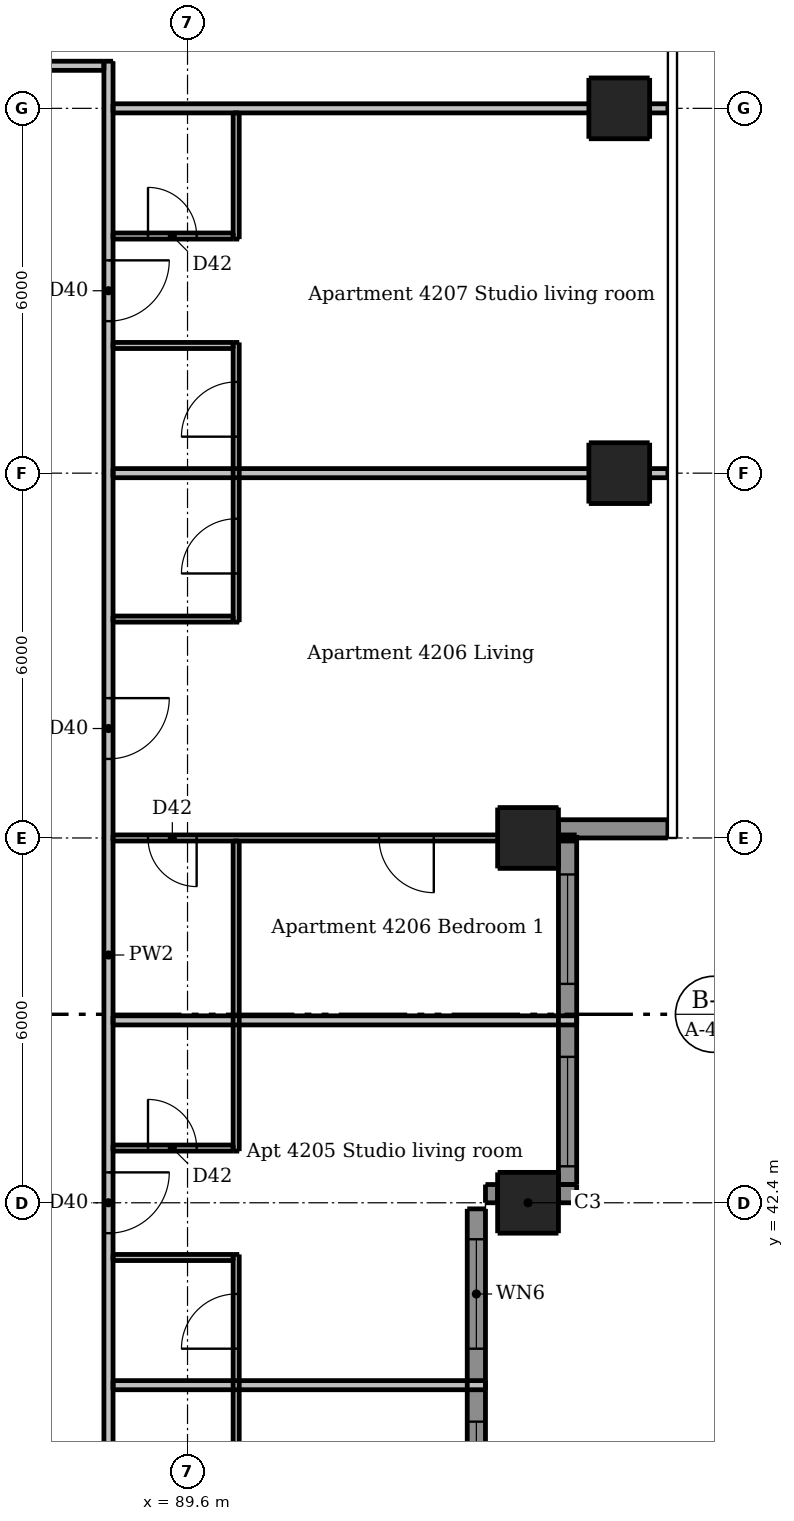
"""IFC4 building model, lengths in metres.
Left out: names, types, materials, properties, quantities, classifications, styles, units other than length and angle.
Written with IfcOpenShell. Run it as: python <this file> out.ifc"""

import sys

from ifc_helpers import new_model, si_unit, direction, frame, frame_2d, origin, origin_2d, place, context, subcontext, project, spatial, rectangle, extrude, element, fill, save


model = new_model("IFC4")
c1 = context("Model", 3, precision=1e-05, world=origin(), true_north=direction((0.0, 1.0)))
c2 = subcontext(c1, "Body", "Model", "MODEL_VIEW")
j1 = project(units=[si_unit("LENGTHUNIT", "METRE"), si_unit("PLANEANGLEUNIT", "RADIAN")], contexts=[c1])
p1 = place(None, origin())
s1 = spatial("IfcSite", under=j1, at=p1, CompositionType="ELEMENT")
p2 = place(p1, origin())
s2 = spatial("IfcBuilding", under=s1, at=p2, CompositionType="ELEMENT")
p3 = place(p2, frame((0.0, 0.0, 158.2)))
s3 = spatial("IfcBuildingStorey", under=s2, at=p3, CompositionType="ELEMENT", Elevation=158.2)
for number, where, z_axis, x_axis in (
    (1, (95.2, 42.4, 0.0), (0.0, 0.0, 1.0), (1.0, 0.0, 0.0)),
    (2, (95.2, 48.4, 0.0), (0.0, 0.0, 1.0), (1.0, 0.0, 0.0)),
    (3, (96.7, 54.4, 0.0), (0.0, 0.0, 1.0), (1.0, 0.0, 0.0)),
    (4, (96.7, 60.4, 0.0), (0.0, 0.0, 1.0), (1.0, 0.0, 0.0)),
):
    element("IfcColumn", number, at=place(p3, frame(where, z_axis=z_axis, x_axis=x_axis)), inside=s3, PredefinedType="COLUMN", context=c2, shape_type="SweptSolid", body=[
        extrude(rectangle(XDim=1.0, YDim=1.0, at=origin_2d()), origin(), (0.0, 0.0, 1.0), 3.05),
    ])
p4 = place(p3, frame((94.5, 42.55, 0.0), z_axis=(0.0, 0.0, 1.0), x_axis=(1.0, 0.0, 0.0)))
e5 = element("IfcWall", 5, at=p4, inside=s3, PredefinedType="SOLIDWALL", context=c2, shape_type="SweptSolid", body=[
    extrude(rectangle(XDim=0.2, YDim=0.3, at=frame_2d((0.1, 0.0))), origin(), (0.0, 0.0, 1.0), 3.05),
])
p5 = place(p3, frame((95.7, 42.55, 0.0), z_axis=(0.0, 0.0, 1.0), x_axis=(1.0, 0.0, 0.0)))
e6 = element("IfcWall", 6, at=p5, inside=s3, PredefinedType="SOLIDWALL", context=c2, shape_type="SweptSolid", body=[
    extrude(rectangle(XDim=0.3, YDim=0.3, at=frame_2d((0.15, 0.0))), origin(), (0.0, 0.0, 1.0), 3.05),
])
p6 = place(p3, frame((95.7, 48.55, 0.0), z_axis=(0.0, 0.0, 1.0), x_axis=(1.0, 0.0, 0.0)))
e7 = element("IfcWall", 7, at=p6, inside=s3, PredefinedType="SOLIDWALL", context=c2, shape_type="SweptSolid", body=[
    extrude(rectangle(XDim=1.8, YDim=0.3, at=frame_2d((0.9, 0.0))), origin(), (0.0, 0.0, 1.0), 3.05),
])
p7 = place(p3, frame((94.35, 36.7, 0.0), z_axis=(0.0, 0.0, 1.0), x_axis=(0.0, 1.0, 0.0)))
e8 = element("IfcWall", 8, at=p7, inside=s3, PredefinedType="SOLIDWALL", context=c2, shape_type="SweptSolid", body=[
    extrude(rectangle(XDim=5.6, YDim=0.3, at=frame_2d((2.8, 0.0))), origin(), (0.0, 0.0, 1.0), 3.05),
])
p8 = place(p7, frame((0.3, 0.0, 0.15)))
e9 = element("IfcOpeningElement", 9, at=p8, cuts=e8, PredefinedType="OPENING", context=c2, shape_type="SweptSolid", body=[
    extrude(rectangle(XDim=1.8, YDim=2.1, at=frame_2d((0.9, 1.05))), frame((0.0, 0.16, 0.0), z_axis=(0.0, -1.0, 0.0), x_axis=(1.0, 0.0, 0.0)), (0.0, 0.0, 1.0), 0.32),
])
p9 = place(p7, frame((3.3, 0.0, 0.15)))
e10 = element("IfcOpeningElement", 10, at=p9, cuts=e8, PredefinedType="OPENING", context=c2, shape_type="SweptSolid", body=[
    extrude(rectangle(XDim=1.8, YDim=2.1, at=frame_2d((0.9, 1.05))), frame((0.0, 0.16, 0.0), z_axis=(0.0, -1.0, 0.0), x_axis=(1.0, 0.0, 0.0)), (0.0, 0.0, 1.0), 0.32),
])
p10 = place(p3, frame((95.85, 42.7, 0.0), z_axis=(0.0, 0.0, 1.0), x_axis=(0.0, 1.0, 0.0)))
e11 = element("IfcWall", 11, at=p10, inside=s3, PredefinedType="SOLIDWALL", context=c2, shape_type="SweptSolid", body=[
    extrude(rectangle(XDim=5.7, YDim=0.3, at=frame_2d((2.85, 0.0))), origin(), (0.0, 0.0, 1.0), 3.05),
])
p11 = place(p10, frame((0.3, 0.0, 0.15)))
e12 = element("IfcOpeningElement", 12, at=p11, cuts=e11, PredefinedType="OPENING", context=c2, shape_type="SweptSolid", body=[
    extrude(rectangle(XDim=1.8, YDim=2.1, at=frame_2d((0.9, 1.05))), frame((0.0, 0.16, 0.0), z_axis=(0.0, -1.0, 0.0), x_axis=(1.0, 0.0, 0.0)), (0.0, 0.0, 1.0), 0.32),
])
p12 = place(p10, frame((3.3, 0.0, 0.15)))
e13 = element("IfcOpeningElement", 13, at=p12, cuts=e11, PredefinedType="OPENING", context=c2, shape_type="SweptSolid", body=[
    extrude(rectangle(XDim=1.8, YDim=2.1, at=frame_2d((0.9, 1.05))), frame((0.0, 0.16, 0.0), z_axis=(0.0, -1.0, 0.0), x_axis=(1.0, 0.0, 0.0)), (0.0, 0.0, 1.0), 0.32),
])
p13 = place(p3, frame((90.4, 33.45, 0.0), z_axis=(0.0, 0.0, 1.0), x_axis=(0.0, 1.0, 0.0)))
e14 = element("IfcWall", 14, at=p13, inside=s3, PredefinedType="PARTITIONING", context=c2, shape_type="SweptSolid", body=[
    extrude(rectangle(XDim=8.1, YDim=0.1, at=frame_2d((4.05, 0.0))), origin(), (0.0, 0.0, 1.0), 3.05),
])
p14 = place(p13, frame((3.75, 0.0, 0.0)))
e15 = element("IfcOpeningElement", 15, at=p14, cuts=e14, PredefinedType="OPENING", context=c2, shape_type="SweptSolid", body=[
    extrude(rectangle(XDim=0.8, YDim=2.1, at=frame_2d((0.4, 1.05))), frame((0.0, 0.06, 0.0), z_axis=(0.0, -1.0, 0.0), x_axis=(1.0, 0.0, 0.0)), (0.0, 0.0, 1.0), 0.12),
])
p15 = place(p13, frame((6.55, 0.0, 0.0)))
e16 = element("IfcOpeningElement", 16, at=p15, cuts=e14, PredefinedType="OPENING", context=c2, shape_type="SweptSolid", body=[
    extrude(rectangle(XDim=0.9, YDim=2.1, at=frame_2d((0.45, 1.05))), frame((0.0, 0.06, 0.0), z_axis=(0.0, -1.0, 0.0), x_axis=(1.0, 0.0, 0.0)), (0.0, 0.0, 1.0), 0.12),
])
p16 = place(p3, frame((90.4, 43.25, 0.0), z_axis=(0.0, 0.0, 1.0), x_axis=(0.0, 1.0, 0.0)))
e17 = element("IfcWall", 17, at=p16, inside=s3, PredefinedType="PARTITIONING", context=c2, shape_type="SweptSolid", body=[
    extrude(rectangle(XDim=5.1, YDim=0.1, at=frame_2d((2.55, 0.0))), origin(), (0.0, 0.0, 1.0), 3.05),
])
p17 = place(p3, frame((90.4, 51.95, 0.0), z_axis=(0.0, 0.0, 1.0), x_axis=(0.0, 1.0, 0.0)))
e18 = element("IfcWall", 18, at=p17, inside=s3, PredefinedType="PARTITIONING", context=c2, shape_type="SweptSolid", body=[
    extrude(rectangle(XDim=4.6, YDim=0.1, at=frame_2d((2.3, 0.0))), origin(), (0.0, 0.0, 1.0), 3.05),
])
p18 = place(p17, frame((0.8, 0.0, 0.0)))
e19 = element("IfcOpeningElement", 19, at=p18, cuts=e18, PredefinedType="OPENING", context=c2, shape_type="SweptSolid", body=[
    extrude(rectangle(XDim=0.9, YDim=2.1, at=frame_2d((0.45, 1.05))), frame((0.0, 0.06, 0.0), z_axis=(0.0, -1.0, 0.0), x_axis=(1.0, 0.0, 0.0)), (0.0, 0.0, 1.0), 0.12),
])
p19 = place(p17, frame((3.05, 0.0, 0.0)))
e20 = element("IfcOpeningElement", 20, at=p19, cuts=e18, PredefinedType="OPENING", context=c2, shape_type="SweptSolid", body=[
    extrude(rectangle(XDim=0.9, YDim=2.1, at=frame_2d((0.45, 1.05))), frame((0.0, 0.06, 0.0), z_axis=(0.0, -1.0, 0.0), x_axis=(1.0, 0.0, 0.0)), (0.0, 0.0, 1.0), 0.12),
])
p20 = place(p3, frame((90.4, 58.25, 0.0), z_axis=(0.0, 0.0, 1.0), x_axis=(0.0, 1.0, 0.0)))
e21 = element("IfcWall", 21, at=p20, inside=s3, PredefinedType="PARTITIONING", context=c2, shape_type="SweptSolid", body=[
    extrude(rectangle(XDim=2.075, YDim=0.1, at=frame_2d((1.038, 0.0))), origin(), (0.0, 0.0, 1.0), 3.05),
])
p21 = place(p3, frame((88.375, 58.3, 0.0), z_axis=(0.0, 0.0, 1.0), x_axis=(1.0, 0.0, 0.0)))
e22 = element("IfcWall", 22, at=p21, inside=s3, PredefinedType="PARTITIONING", context=c2, shape_type="SweptSolid", body=[
    extrude(rectangle(XDim=1.975, YDim=0.1, at=frame_2d((0.988, 0.0))), origin(), (0.0, 0.0, 1.0), 3.05),
])
p22 = place(p21, frame((0.575, 0.0, 0.0)))
e23 = element("IfcOpeningElement", 23, at=p22, cuts=e22, PredefinedType="OPENING", context=c2, shape_type="SweptSolid", body=[
    extrude(rectangle(XDim=0.8, YDim=2.1, at=frame_2d((0.4, 1.05))), frame((0.0, 0.06, 0.0), z_axis=(0.0, -1.0, 0.0), x_axis=(1.0, 0.0, 0.0)), (0.0, 0.0, 1.0), 0.12),
])
for number, where, z_axis, x_axis in (
    (24, (88.375, 56.5, 0.0), (0.0, 0.0, 1.0), (1.0, 0.0, 0.0)),
    (25, (88.375, 52.0, 0.0), (0.0, 0.0, 1.0), (1.0, 0.0, 0.0)),
):
    element("IfcWall", number, at=place(p3, frame(where, z_axis=z_axis, x_axis=x_axis)), inside=s3, PredefinedType="PARTITIONING", context=c2, shape_type="SweptSolid", body=[
        extrude(rectangle(XDim=1.975, YDim=0.1, at=frame_2d((0.988, 0.0))), origin(), (0.0, 0.0, 1.0), 3.05),
    ])
p23 = place(p3, frame((96.0, 48.4, 0.0), z_axis=(0.0, 0.0, 1.0), x_axis=(-1.0, 0.0, 0.0)))
e26 = element("IfcWall", 26, at=p23, inside=s3, PredefinedType="PARTITIONING", context=c2, shape_type="SweptSolid", body=[
    extrude(rectangle(XDim=7.625, YDim=0.1, at=frame_2d((3.812, 0.0))), origin(), (0.0, 0.0, 1.0), 2.59),
])
p24 = place(p23, frame((2.35, 0.0, 0.0)))
e27 = element("IfcOpeningElement", 27, at=p24, cuts=e26, PredefinedType="OPENING", context=c2, shape_type="SweptSolid", body=[
    extrude(rectangle(XDim=0.9, YDim=2.1, at=frame_2d((0.45, 1.05))), frame((0.0, 0.06, 0.0), z_axis=(0.0, -1.0, 0.0), x_axis=(1.0, 0.0, 0.0)), (0.0, 0.0, 1.0), 0.12),
])
p25 = place(p23, frame((6.25, 0.0, 0.0)))
e28 = element("IfcOpeningElement", 28, at=p25, cuts=e26, PredefinedType="OPENING", context=c2, shape_type="SweptSolid", body=[
    extrude(rectangle(XDim=0.8, YDim=2.1, at=frame_2d((0.4, 1.05))), frame((0.0, 0.06, 0.0), z_axis=(0.0, -1.0, 0.0), x_axis=(1.0, 0.0, 0.0)), (0.0, 0.0, 1.0), 0.12),
])
p26 = place(p3, frame((88.375, 43.3, 0.0), z_axis=(0.0, 0.0, 1.0), x_axis=(1.0, 0.0, 0.0)))
e29 = element("IfcWall", 29, at=p26, inside=s3, PredefinedType="PARTITIONING", context=c2, shape_type="SweptSolid", body=[
    extrude(rectangle(XDim=1.975, YDim=0.1, at=frame_2d((0.988, 0.0))), origin(), (0.0, 0.0, 1.0), 3.05),
])
p27 = place(p26, frame((0.575, 0.0, 0.0)))
e30 = element("IfcOpeningElement", 30, at=p27, cuts=e29, PredefinedType="OPENING", context=c2, shape_type="SweptSolid", body=[
    extrude(rectangle(XDim=0.8, YDim=2.1, at=frame_2d((0.4, 1.05))), frame((0.0, 0.06, 0.0), z_axis=(0.0, -1.0, 0.0), x_axis=(1.0, 0.0, 0.0)), (0.0, 0.0, 1.0), 0.12),
])
p28 = place(p3, frame((88.375, 41.5, 0.0), z_axis=(0.0, 0.0, 1.0), x_axis=(1.0, 0.0, 0.0)))
e31 = element("IfcWall", 31, at=p28, inside=s3, PredefinedType="PARTITIONING", context=c2, shape_type="SweptSolid", body=[
    extrude(rectangle(XDim=1.975, YDim=0.1, at=frame_2d((0.988, 0.0))), origin(), (0.0, 0.0, 1.0), 3.05),
])
p29 = place(p3, frame((88.3, 61.175, 0.0), z_axis=(0.0, 0.0, 1.0), x_axis=(0.0, -1.0, 0.0)))
e32 = element("IfcWall", 32, at=p29, inside=s3, PredefinedType="PARTITIONING", context=c2, shape_type="SweptSolid", body=[
    extrude(rectangle(XDim=29.4, YDim=0.15, at=frame_2d((14.7, 0.0))), origin(), (0.0, 0.0, 1.0), 3.05),
])
p30 = place(p29, frame((28.125, 0.0, 0.0)))
e33 = element("IfcOpeningElement", 33, at=p30, cuts=e32, PredefinedType="OPENING", context=c2, shape_type="SweptSolid", body=[
    extrude(rectangle(XDim=1.0, YDim=2.1, at=frame_2d((0.5, 1.05))), frame((0.0, 0.085, 0.0), z_axis=(0.0, -1.0, 0.0), x_axis=(1.0, 0.0, 0.0)), (0.0, 0.0, 1.0), 0.17),
])
p31 = place(p29, frame((18.275, 0.0, 0.0)))
e34 = element("IfcOpeningElement", 34, at=p31, cuts=e32, PredefinedType="OPENING", context=c2, shape_type="SweptSolid", body=[
    extrude(rectangle(XDim=1.0, YDim=2.1, at=frame_2d((0.5, 1.05))), frame((0.0, 0.085, 0.0), z_axis=(0.0, -1.0, 0.0), x_axis=(1.0, 0.0, 0.0)), (0.0, 0.0, 1.0), 0.17),
])
p32 = place(p29, frame((10.475, 0.0, 0.0)))
e35 = element("IfcOpeningElement", 35, at=p32, cuts=e32, PredefinedType="OPENING", context=c2, shape_type="SweptSolid", body=[
    extrude(rectangle(XDim=1.0, YDim=2.1, at=frame_2d((0.5, 1.05))), frame((0.0, 0.085, 0.0), z_axis=(0.0, -1.0, 0.0), x_axis=(1.0, 0.0, 0.0)), (0.0, 0.0, 1.0), 0.17),
])
p33 = place(p29, frame((3.275, 0.0, 0.0)))
e36 = element("IfcOpeningElement", 36, at=p33, cuts=e32, PredefinedType="OPENING", context=c2, shape_type="SweptSolid", body=[
    extrude(rectangle(XDim=1.0, YDim=2.1, at=frame_2d((0.5, 1.05))), frame((0.0, 0.085, 0.0), z_axis=(0.0, -1.0, 0.0), x_axis=(1.0, 0.0, 0.0)), (0.0, 0.0, 1.0), 0.17),
])
p34 = place(p3, frame((58.975, 61.1, 0.0), z_axis=(0.0, 0.0, 1.0), x_axis=(1.0, 0.0, 0.0)))
e37 = element("IfcWall", 37, at=p34, inside=s3, PredefinedType="PARTITIONING", context=c2, shape_type="SweptSolid", body=[
    extrude(rectangle(XDim=29.25, YDim=0.15, at=frame_2d((14.625, 0.0))), origin(), (0.0, 0.0, 1.0), 3.05),
])
p35 = place(p34, frame((3.125, 0.0, 0.0)))
e38 = element("IfcOpeningElement", 38, at=p35, cuts=e37, PredefinedType="OPENING", context=c2, shape_type="SweptSolid", body=[
    extrude(rectangle(XDim=1.0, YDim=2.1, at=frame_2d((0.5, 1.05))), frame((0.0, 0.085, 0.0), z_axis=(0.0, -1.0, 0.0), x_axis=(1.0, 0.0, 0.0)), (0.0, 0.0, 1.0), 0.17),
])
p36 = place(p34, frame((9.125, 0.0, 0.0)))
e39 = element("IfcOpeningElement", 39, at=p36, cuts=e37, PredefinedType="OPENING", context=c2, shape_type="SweptSolid", body=[
    extrude(rectangle(XDim=1.0, YDim=2.1, at=frame_2d((0.5, 1.05))), frame((0.0, 0.085, 0.0), z_axis=(0.0, -1.0, 0.0), x_axis=(1.0, 0.0, 0.0)), (0.0, 0.0, 1.0), 0.17),
])
p37 = place(p34, frame((15.125, 0.0, 0.0)))
e40 = element("IfcOpeningElement", 40, at=p37, cuts=e37, PredefinedType="OPENING", context=c2, shape_type="SweptSolid", body=[
    extrude(rectangle(XDim=1.0, YDim=2.1, at=frame_2d((0.5, 1.05))), frame((0.0, 0.085, 0.0), z_axis=(0.0, -1.0, 0.0), x_axis=(1.0, 0.0, 0.0)), (0.0, 0.0, 1.0), 0.17),
])
p38 = place(p34, frame((26.475, 0.0, 0.0)))
e41 = element("IfcOpeningElement", 41, at=p38, cuts=e37, PredefinedType="OPENING", context=c2, shape_type="SweptSolid", body=[
    extrude(rectangle(XDim=1.0, YDim=2.1, at=frame_2d((0.5, 1.05))), frame((0.0, 0.085, 0.0), z_axis=(0.0, -1.0, 0.0), x_axis=(1.0, 0.0, 0.0)), (0.0, 0.0, 1.0), 0.17),
])
p39 = place(p3, frame((88.375, 60.4, 0.0), z_axis=(0.0, 0.0, 1.0), x_axis=(1.0, 0.0, 0.0)))
e42 = element("IfcWall", 42, at=p39, inside=s3, PredefinedType="PARTITIONING", context=c2, shape_type="SweptSolid", body=[
    extrude(rectangle(XDim=9.125, YDim=0.15, at=frame_2d((4.562, 0.0))), origin(), (0.0, 0.0, 1.0), 2.647),
])
p40 = place(p3, frame((88.375, 54.4, 0.0), z_axis=(0.0, 0.0, 1.0), x_axis=(1.0, 0.0, 0.0)))
e43 = element("IfcWall", 43, at=p40, inside=s3, PredefinedType="PARTITIONING", context=c2, shape_type="SweptSolid", body=[
    extrude(rectangle(XDim=9.125, YDim=0.15, at=frame_2d((4.562, 0.0))), origin(), (0.0, 0.0, 1.0), 2.516),
])
p41 = place(p3, frame((88.375, 45.4, 0.0), z_axis=(0.0, 0.0, 1.0), x_axis=(1.0, 0.0, 0.0)))
e44 = element("IfcWall", 44, at=p41, inside=s3, PredefinedType="PARTITIONING", context=c2, shape_type="SweptSolid", body=[
    extrude(rectangle(XDim=7.625, YDim=0.15, at=frame_2d((3.812, 0.0))), origin(), (0.0, 0.0, 1.0), 3.05),
])
p42 = place(p3, frame((88.375, 39.4, 0.0), z_axis=(0.0, 0.0, 1.0), x_axis=(1.0, 0.0, 0.0)))
e45 = element("IfcWall", 45, at=p42, inside=s3, PredefinedType="PARTITIONING", context=c2, shape_type="SweptSolid", body=[
    extrude(rectangle(XDim=6.125, YDim=0.15, at=frame_2d((3.062, 0.0))), origin(), (0.0, 0.0, 1.0), 3.05),
])
p43 = place(p8, origin())
e46 = element("IfcWindow", 46, at=p43, inside=s3, PartitioningType="DOUBLE_PANEL_VERTICAL", PredefinedType="WINDOW", context=c2, shape_type="SweptSolid", body=[
    extrude(rectangle(XDim=1.8, YDim=2.1, at=frame_2d((0.9, 1.05))), frame((0.0, 0.03, 0.0), z_axis=(0.0, -1.0, 0.0), x_axis=(1.0, 0.0, 0.0)), (0.0, 0.0, 1.0), 0.06),
])
fill(e9, e46)
p44 = place(p9, origin())
e47 = element("IfcWindow", 47, at=p44, inside=s3, PartitioningType="DOUBLE_PANEL_VERTICAL", PredefinedType="WINDOW", context=c2, shape_type="SweptSolid", body=[
    extrude(rectangle(XDim=1.8, YDim=2.1, at=frame_2d((0.9, 1.05))), frame((0.0, 0.03, 0.0), z_axis=(0.0, -1.0, 0.0), x_axis=(1.0, 0.0, 0.0)), (0.0, 0.0, 1.0), 0.06),
])
fill(e10, e47)
p45 = place(p11, origin())
e48 = element("IfcWindow", 48, at=p45, inside=s3, PartitioningType="DOUBLE_PANEL_VERTICAL", PredefinedType="WINDOW", context=c2, shape_type="SweptSolid", body=[
    extrude(rectangle(XDim=1.8, YDim=2.1, at=frame_2d((0.9, 1.05))), frame((0.0, 0.03, 0.0), z_axis=(0.0, -1.0, 0.0), x_axis=(1.0, 0.0, 0.0)), (0.0, 0.0, 1.0), 0.06),
])
fill(e12, e48)
p46 = place(p12, origin())
e49 = element("IfcWindow", 49, at=p46, inside=s3, PartitioningType="DOUBLE_PANEL_VERTICAL", PredefinedType="WINDOW", context=c2, shape_type="SweptSolid", body=[
    extrude(rectangle(XDim=1.8, YDim=2.1, at=frame_2d((0.9, 1.05))), frame((0.0, 0.03, 0.0), z_axis=(0.0, -1.0, 0.0), x_axis=(1.0, 0.0, 0.0)), (0.0, 0.0, 1.0), 0.06),
])
fill(e13, e49)
p47 = place(p31, origin())
e50 = element("IfcDoor", 50, at=p47, inside=s3, OperationType="SINGLE_SWING_LEFT", PredefinedType="DOOR", context=c2, shape_type="SweptSolid", body=[
    extrude(rectangle(XDim=1.0, YDim=2.1, at=frame_2d((0.5, 1.05))), frame((0.0, 0.025, 0.0), z_axis=(0.0, -1.0, 0.0), x_axis=(1.0, 0.0, 0.0)), (0.0, 0.0, 1.0), 0.05),
])
fill(e34, e50)
p48 = place(p15, origin())
e51 = element("IfcDoor", 51, at=p48, inside=s3, OperationType="SINGLE_SWING_LEFT", PredefinedType="DOOR", context=c2, shape_type="SweptSolid", body=[
    extrude(rectangle(XDim=0.9, YDim=2.1, at=frame_2d((0.45, 1.05))), frame((0.0, 0.025, 0.0), z_axis=(0.0, -1.0, 0.0), x_axis=(1.0, 0.0, 0.0)), (0.0, 0.0, 1.0), 0.05),
])
fill(e16, e51)
p49 = place(p27, origin())
e52 = element("IfcDoor", 52, at=p49, inside=s3, OperationType="SINGLE_SWING_LEFT", PredefinedType="DOOR", context=c2, shape_type="SweptSolid", body=[
    extrude(rectangle(XDim=0.8, YDim=2.1, at=frame_2d((0.4, 1.05))), frame((0.0, 0.025, 0.0), z_axis=(0.0, -1.0, 0.0), x_axis=(1.0, 0.0, 0.0)), (0.0, 0.0, 1.0), 0.05),
])
fill(e30, e52)
p50 = place(p32, origin())
e53 = element("IfcDoor", 53, at=p50, inside=s3, OperationType="SINGLE_SWING_LEFT", PredefinedType="DOOR", context=c2, shape_type="SweptSolid", body=[
    extrude(rectangle(XDim=1.0, YDim=2.1, at=frame_2d((0.5, 1.05))), frame((0.0, 0.025, 0.0), z_axis=(0.0, -1.0, 0.0), x_axis=(1.0, 0.0, 0.0)), (0.0, 0.0, 1.0), 0.05),
])
fill(e35, e53)
p51 = place(p18, origin())
e54 = element("IfcDoor", 54, at=p51, inside=s3, OperationType="SINGLE_SWING_LEFT", PredefinedType="DOOR", context=c2, shape_type="SweptSolid", body=[
    extrude(rectangle(XDim=0.9, YDim=2.1, at=frame_2d((0.45, 1.05))), frame((0.0, 0.025, 0.0), z_axis=(0.0, -1.0, 0.0), x_axis=(1.0, 0.0, 0.0)), (0.0, 0.0, 1.0), 0.05),
])
fill(e19, e54)
p52 = place(p24, origin())
e55 = element("IfcDoor", 55, at=p52, inside=s3, OperationType="SINGLE_SWING_LEFT", PredefinedType="DOOR", context=c2, shape_type="SweptSolid", body=[
    extrude(rectangle(XDim=0.9, YDim=2.1, at=frame_2d((0.45, 1.05))), frame((0.0, 0.025, 0.0), z_axis=(0.0, -1.0, 0.0), x_axis=(1.0, 0.0, 0.0)), (0.0, 0.0, 1.0), 0.05),
])
fill(e27, e55)
p53 = place(p25, origin())
e56 = element("IfcDoor", 56, at=p53, inside=s3, OperationType="SINGLE_SWING_LEFT", PredefinedType="DOOR", context=c2, shape_type="SweptSolid", body=[
    extrude(rectangle(XDim=0.8, YDim=2.1, at=frame_2d((0.4, 1.05))), frame((0.0, 0.025, 0.0), z_axis=(0.0, -1.0, 0.0), x_axis=(1.0, 0.0, 0.0)), (0.0, 0.0, 1.0), 0.05),
])
fill(e28, e56)
p54 = place(p33, origin())
e57 = element("IfcDoor", 57, at=p54, inside=s3, OperationType="SINGLE_SWING_LEFT", PredefinedType="DOOR", context=c2, shape_type="SweptSolid", body=[
    extrude(rectangle(XDim=1.0, YDim=2.1, at=frame_2d((0.5, 1.05))), frame((0.0, 0.025, 0.0), z_axis=(0.0, -1.0, 0.0), x_axis=(1.0, 0.0, 0.0)), (0.0, 0.0, 1.0), 0.05),
])
fill(e36, e57)
p55 = place(p19, origin())
e58 = element("IfcDoor", 58, at=p55, inside=s3, OperationType="SINGLE_SWING_LEFT", PredefinedType="DOOR", context=c2, shape_type="SweptSolid", body=[
    extrude(rectangle(XDim=0.9, YDim=2.1, at=frame_2d((0.45, 1.05))), frame((0.0, 0.025, 0.0), z_axis=(0.0, -1.0, 0.0), x_axis=(1.0, 0.0, 0.0)), (0.0, 0.0, 1.0), 0.05),
])
fill(e20, e58)
p56 = place(p22, origin())
e59 = element("IfcDoor", 59, at=p56, inside=s3, OperationType="SINGLE_SWING_LEFT", PredefinedType="DOOR", context=c2, shape_type="SweptSolid", body=[
    extrude(rectangle(XDim=0.8, YDim=2.1, at=frame_2d((0.4, 1.05))), frame((0.0, 0.025, 0.0), z_axis=(0.0, -1.0, 0.0), x_axis=(1.0, 0.0, 0.0)), (0.0, 0.0, 1.0), 0.05),
])
fill(e23, e59)
save(model, sys.argv[1])
